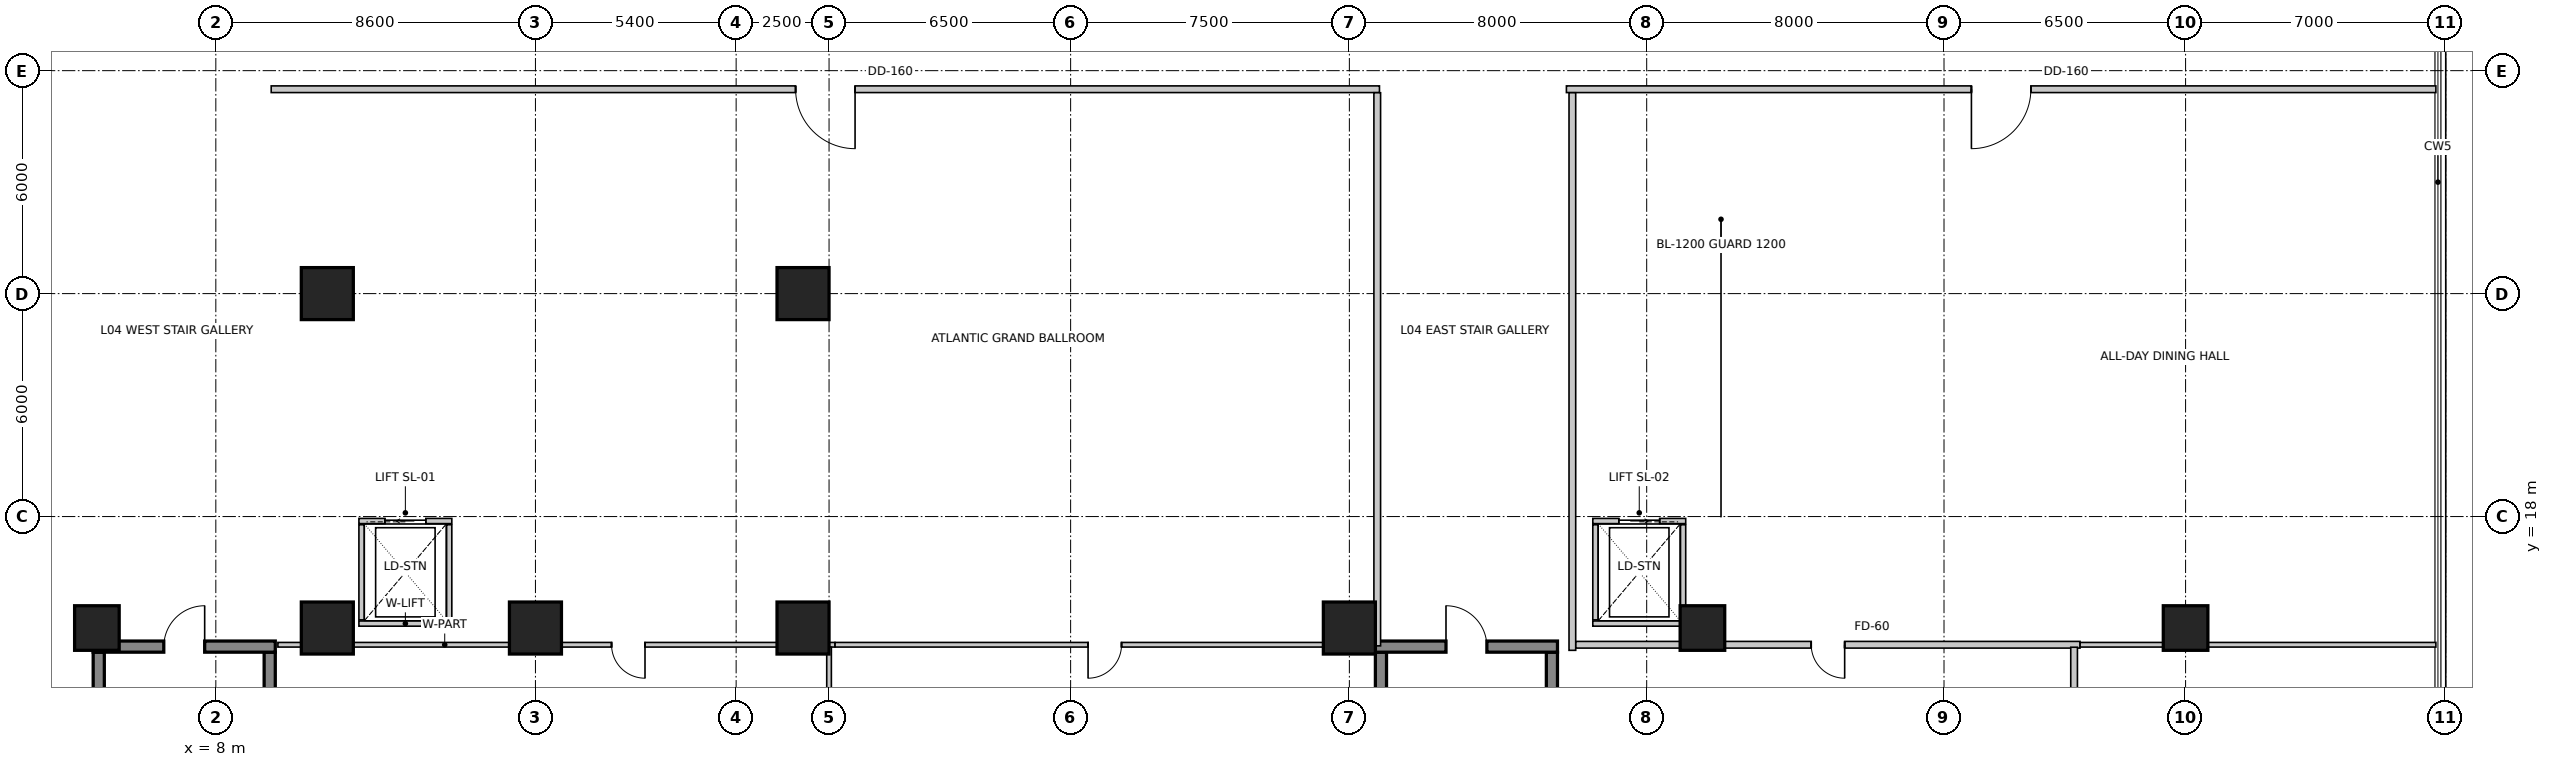
"""IFC4 building model, lengths in metres.
Left out: names, types, materials, properties, quantities, classifications, styles, units other than length and angle.
Written with IfcOpenShell. Run it as: python <this file> out.ifc"""

import sys

from ifc_helpers import new_model, si_unit, direction, frame, frame_2d, origin, origin_2d, place, context, subcontext, project, spatial, rectangle, extrude, source, transform, mapped, element, fill, save


model = new_model("IFC4")
c1 = context("Model", 3, precision=1e-05, world=origin(), true_north=direction((0.0, 1.0)))
c2 = subcontext(c1, "Body", "Model", "MODEL_VIEW")
j1 = project(units=[si_unit("LENGTHUNIT", "METRE"), si_unit("PLANEANGLEUNIT", "RADIAN")], contexts=[c1])
p1 = place(None, origin())
s1 = spatial("IfcSite", under=j1, at=p1, CompositionType="ELEMENT")
p2 = place(p1, origin())
s2 = spatial("IfcBuilding", under=s1, at=p2, CompositionType="ELEMENT")
p3 = place(p2, frame((0.0, 0.0, 16.4)))
s3 = spatial("IfcBuildingStorey", under=s2, at=p3, CompositionType="ELEMENT", Elevation=16.4)
for number, where, z_axis, x_axis in (
    (1, (4.85, 4.45, 0.0), (0.0, 0.0, 1.0), (0.0, 1.0, 0.0)),
    (2, (9.45, 4.45, 0.0), (0.0, 0.0, 1.0), (0.0, 1.0, 0.0)),
):
    element("IfcWall", number, at=place(p3, frame(where, z_axis=z_axis, x_axis=x_axis)), inside=s3, PredefinedType="SHEAR", context=c2, shape_type="SweptSolid", body=[
        extrude(rectangle(XDim=9.9, YDim=0.3, at=frame_2d((4.95, 0.0))), origin(), (0.0, 0.0, 1.0), 5.2),
    ])
p4 = place(p3, frame((4.7, 14.5, 0.0), z_axis=(0.0, 0.0, 1.0), x_axis=(1.0, 0.0, 0.0)))
e3 = element("IfcWall", 3, at=p4, inside=s3, PredefinedType="SHEAR", context=c2, shape_type="SweptSolid", body=[
    extrude(rectangle(XDim=4.9, YDim=0.3, at=frame_2d((2.45, 0.0))), origin(), (0.0, 0.0, 1.0), 5.2),
])
m1 = source(origin(), c2, "Body", "SweptSolid", [
    extrude(rectangle(XDim=1.1, YDim=2.15, at=frame_2d((0.55, 1.075))), frame((0.0, 0.16, 0.0), z_axis=(0.0, -1.0, 0.0), x_axis=(1.0, 0.0, 0.0)), (0.0, 0.0, 1.0), 0.32),
])
p5 = place(p4, frame((1.9, 0.0, 0.0)))
e4 = element("IfcOpeningElement", 4, at=p5, cuts=e3, PredefinedType="OPENING", context=c2, shape_type="MappedRepresentation", body=[
    mapped(m1, transform((0.0, 0.0, 0.0), scale=1.0)),
])
for number, where, z_axis, x_axis in (
    (5, (39.35, 4.45, 0.0), (0.0, 0.0, 1.0), (0.0, 1.0, 0.0)),
    (6, (43.95, 4.45, 0.0), (0.0, 0.0, 1.0), (0.0, 1.0, 0.0)),
):
    element("IfcWall", number, at=place(p3, frame(where, z_axis=z_axis, x_axis=x_axis)), inside=s3, PredefinedType="SHEAR", context=c2, shape_type="SweptSolid", body=[
        extrude(rectangle(XDim=9.9, YDim=0.3, at=frame_2d((4.95, 0.0))), origin(), (0.0, 0.0, 1.0), 5.2),
    ])
p6 = place(p3, frame((39.2, 14.5, 0.0), z_axis=(0.0, 0.0, 1.0), x_axis=(1.0, 0.0, 0.0)))
e7 = element("IfcWall", 7, at=p6, inside=s3, PredefinedType="SHEAR", context=c2, shape_type="SweptSolid", body=[
    extrude(rectangle(XDim=4.9, YDim=0.3, at=frame_2d((2.45, 0.0))), origin(), (0.0, 0.0, 1.0), 5.2),
])
p7 = place(p6, frame((1.9, 0.0, 0.0)))
e8 = element("IfcOpeningElement", 8, at=p7, cuts=e7, PredefinedType="OPENING", context=c2, shape_type="MappedRepresentation", body=[
    mapped(m1, transform((0.0, 0.0, 0.0), scale=1.0)),
])
m2 = source(origin(), c2, "Body", "SweptSolid", [
    extrude(rectangle(XDim=1.2, YDim=1.2, at=origin_2d()), origin(), (0.0, 0.0, 1.0), 5.2),
])
p8 = place(p3, frame((4.8, 15.0, 0.0), z_axis=(0.0, 0.0, 1.0), x_axis=(1.0, 0.0, 0.0)))
e9 = element("IfcColumn", 9, at=p8, inside=s3, PredefinedType="COLUMN", context=c2, shape_type="MappedRepresentation", body=[
    mapped(m2, transform((0.0, 0.0, 0.0), scale=1.0)),
])
m3 = source(origin(), c2, "Body", "SweptSolid", [
    extrude(rectangle(XDim=1.4, YDim=1.4, at=origin_2d()), origin(), (0.0, 0.0, 1.0), 5.2),
])
for number, where, z_axis, x_axis in (
    (10, (11.0, 15.0, 0.0), (0.0, 0.0, 1.0), (1.0, 0.0, 0.0)),
    (11, (16.6, 15.0, 0.0), (0.0, 0.0, 1.0), (1.0, 0.0, 0.0)),
    (12, (23.8, 15.0, 0.0), (0.0, 0.0, 1.0), (1.0, 0.0, 0.0)),
    (13, (38.5, 15.0, 0.0), (0.0, 0.0, 1.0), (1.0, 0.0, 0.0)),
):
    element("IfcColumn", number, at=place(p3, frame(where, z_axis=z_axis, x_axis=x_axis)), inside=s3, PredefinedType="COLUMN", context=c2, shape_type="MappedRepresentation", body=[
        mapped(m3, transform((0.0, 0.0, 0.0), scale=1.0)),
    ])
for number, where, z_axis, x_axis in (
    (14, (48.0, 15.0, 0.0), (0.0, 0.0, 1.0), (1.0, 0.0, 0.0)),
    (15, (61.0, 15.0, 0.0), (0.0, 0.0, 1.0), (1.0, 0.0, 0.0)),
):
    element("IfcColumn", number, at=place(p3, frame(where, z_axis=z_axis, x_axis=x_axis)), inside=s3, PredefinedType="COLUMN", context=c2, shape_type="MappedRepresentation", body=[
        mapped(m2, transform((0.0, 0.0, 0.0), scale=1.0)),
    ])
for number, where, z_axis, x_axis in (
    (16, (11.0, 24.0, 0.0), (0.0, 0.0, 1.0), (1.0, 0.0, 0.0)),
    (17, (23.8, 24.0, 0.0), (0.0, 0.0, 1.0), (1.0, 0.0, 0.0)),
):
    element("IfcColumn", number, at=place(p3, frame(where, z_axis=z_axis, x_axis=x_axis)), inside=s3, PredefinedType="COLUMN", context=c2, shape_type="MappedRepresentation", body=[
        mapped(m3, transform((0.0, 0.0, 0.0), scale=1.0)),
    ])
p9 = place(p3, frame((11.85, 17.88, 0.0), z_axis=(0.0, 0.0, 1.0), x_axis=(1.0, 0.0, 0.0)))
e18 = element("IfcWall", 18, at=p9, inside=s3, PredefinedType="SOLIDWALL", context=c2, shape_type="SweptSolid", body=[
    extrude(rectangle(XDim=2.5, YDim=0.14, at=frame_2d((1.25, 0.0))), origin(), (0.0, 0.0, 1.0), 4.85),
])
m4 = source(origin(), c2, "Body", "SweptSolid", [
    extrude(rectangle(XDim=1.1, YDim=2.15, at=frame_2d((0.55, 1.075))), frame((0.0, 0.08, 0.0), z_axis=(0.0, -1.0, 0.0), x_axis=(1.0, 0.0, 0.0)), (0.0, 0.0, 1.0), 0.16),
])
p10 = place(p9, frame((0.7, 0.0, 0.0)))
e19 = element("IfcOpeningElement", 19, at=p10, cuts=e18, PredefinedType="OPENING", context=c2, shape_type="MappedRepresentation", body=[
    mapped(m4, transform((0.0, 0.0, 0.0), scale=1.0)),
])
p11 = place(p3, frame((11.85, 15.12, 0.0), z_axis=(0.0, 0.0, 1.0), x_axis=(1.0, 0.0, 0.0)))
e20 = element("IfcWall", 20, at=p11, inside=s3, PredefinedType="SOLIDWALL", context=c2, shape_type="SweptSolid", body=[
    extrude(rectangle(XDim=2.5, YDim=0.14, at=frame_2d((1.25, 0.0))), origin(), (0.0, 0.0, 1.0), 3.642),
])
for number, where, z_axis, x_axis in (
    (21, (11.92, 15.22, 0.0), (0.0, 0.0, 1.0), (0.0, 1.0, 0.0)),
    (22, (14.28, 15.22, 0.0), (0.0, 0.0, 1.0), (0.0, 1.0, 0.0)),
):
    element("IfcWall", number, at=place(p3, frame(where, z_axis=z_axis, x_axis=x_axis)), inside=s3, PredefinedType="SOLIDWALL", context=c2, shape_type="SweptSolid", body=[
        extrude(rectangle(XDim=2.56, YDim=0.14, at=frame_2d((1.28, 0.0))), origin(), (0.0, 0.0, 1.0), 3.642),
    ])
p12 = place(p3, frame((45.05, 17.88, 0.0), z_axis=(0.0, 0.0, 1.0), x_axis=(1.0, 0.0, 0.0)))
e23 = element("IfcWall", 23, at=p12, inside=s3, PredefinedType="SOLIDWALL", context=c2, shape_type="SweptSolid", body=[
    extrude(rectangle(XDim=2.5, YDim=0.14, at=frame_2d((1.25, 0.0))), origin(), (0.0, 0.0, 1.0), 4.85),
])
p13 = place(p12, frame((0.7, 0.0, 0.0)))
e24 = element("IfcOpeningElement", 24, at=p13, cuts=e23, PredefinedType="OPENING", context=c2, shape_type="MappedRepresentation", body=[
    mapped(m4, transform((0.0, 0.0, 0.0), scale=1.0)),
])
p14 = place(p3, frame((45.05, 15.12, 0.0), z_axis=(0.0, 0.0, 1.0), x_axis=(1.0, 0.0, 0.0)))
e25 = element("IfcWall", 25, at=p14, inside=s3, PredefinedType="SOLIDWALL", context=c2, shape_type="SweptSolid", body=[
    extrude(rectangle(XDim=2.5, YDim=0.14, at=frame_2d((1.25, 0.0))), origin(), (0.0, 0.0, 1.0), 3.642),
])
p15 = place(p3, frame((45.12, 15.22, 0.0), z_axis=(0.0, 0.0, 1.0), x_axis=(0.0, 1.0, 0.0)))
e26 = element("IfcWall", 26, at=p15, inside=s3, PredefinedType="SOLIDWALL", context=c2, shape_type="SweptSolid", body=[
    extrude(rectangle(XDim=2.56, YDim=0.14, at=frame_2d((1.28, 0.0))), origin(), (0.0, 0.0, 1.0), 3.642),
])
p16 = place(p3, frame((47.48, 15.22, 0.0), z_axis=(0.0, 0.0, 1.0), x_axis=(0.0, 1.0, 0.0)))
e27 = element("IfcWall", 27, at=p16, inside=s3, PredefinedType="SOLIDWALL", context=c2, shape_type="SweptSolid", body=[
    extrude(rectangle(XDim=2.56, YDim=0.14, at=frame_2d((1.28, 0.0))), origin(), (0.0, 0.0, 1.0), 3.042),
])
p17 = place(p3, frame((39.31, 29.5, 0.0), z_axis=(0.0, 0.0, 1.0), x_axis=(-1.0, 0.0, 0.0)))
e28 = element("IfcWall", 28, at=p17, inside=s3, PredefinedType="PARTITIONING", context=c2, shape_type="SweptSolid", body=[
    extrude(rectangle(XDim=29.82, YDim=0.18, at=frame_2d((14.91, 0.0))), origin(), (0.0, 0.0, 1.0), 3.98),
])
m5 = source(origin(), c2, "Body", "SweptSolid", [
    extrude(rectangle(XDim=1.6, YDim=2.15, at=frame_2d((0.8, 1.075))), frame((0.0, 0.1, 0.0), z_axis=(0.0, -1.0, 0.0), x_axis=(1.0, 0.0, 0.0)), (0.0, 0.0, 1.0), 0.2),
])
p18 = place(p17, frame((14.11, 0.0, 0.0)))
e29 = element("IfcOpeningElement", 29, at=p18, cuts=e28, PredefinedType="OPENING", context=c2, shape_type="MappedRepresentation", body=[
    mapped(m5, transform((0.0, 0.0, 0.0), scale=1.0)),
])
p19 = place(p3, frame((67.735, 29.5, 0.0), z_axis=(0.0, 0.0, 1.0), x_axis=(-1.0, 0.0, 0.0)))
e30 = element("IfcWall", 30, at=p19, inside=s3, PredefinedType="PARTITIONING", context=c2, shape_type="SweptSolid", body=[
    extrude(rectangle(XDim=23.395, YDim=0.18, at=frame_2d((11.698, 0.0))), origin(), (0.0, 0.0, 1.0), 3.042),
])
p20 = place(p19, frame((10.897, 0.0, 0.0)))
e31 = element("IfcOpeningElement", 31, at=p20, cuts=e30, PredefinedType="OPENING", context=c2, shape_type="MappedRepresentation", body=[
    mapped(m5, transform((0.0, 0.0, 0.0), scale=1.0)),
])
p21 = place(p3, frame((39.25, 14.52, 0.0), z_axis=(0.0, 0.0, 1.0), x_axis=(0.0, 1.0, 0.0)))
e32 = element("IfcWall", 32, at=p21, inside=s3, PredefinedType="PARTITIONING", context=c2, shape_type="SweptSolid", body=[
    extrude(rectangle(XDim=14.886, YDim=0.18, at=frame_2d((7.443, 0.0))), origin(), (0.0, 0.0, 1.0), 3.642),
])
p22 = place(p3, frame((44.5, 29.406, 0.0), z_axis=(0.0, 0.0, 1.0), x_axis=(0.0, -1.0, 0.0)))
e33 = element("IfcWall", 33, at=p22, inside=s3, PredefinedType="PARTITIONING", context=c2, shape_type="SweptSolid", body=[
    extrude(rectangle(XDim=15.006, YDim=0.18, at=frame_2d((7.503, 0.0))), origin(), (0.0, 0.0, 1.0), 3.642),
])
p23 = place(p3, frame((24.66, 14.55, 0.0), z_axis=(0.0, 0.0, 1.0), x_axis=(-1.0, 0.0, 0.0)))
e34 = element("IfcWall", 34, at=p23, inside=s3, PredefinedType="PARTITIONING", context=c2, shape_type="SweptSolid", body=[
    extrude(rectangle(XDim=14.99, YDim=0.125, at=frame_2d((7.495, 0.0))), origin(), (0.0, 0.0, 1.0), 3.892),
])
m6 = source(origin(), c2, "Body", "SweptSolid", [
    extrude(rectangle(XDim=0.9, YDim=2.15, at=frame_2d((0.45, 1.075))), frame((0.0, 0.073, 0.0), z_axis=(0.0, -1.0, 0.0), x_axis=(1.0, 0.0, 0.0)), (0.0, 0.0, 1.0), 0.145),
])
p24 = place(p23, frame((5.112, 0.0, 0.0)))
e35 = element("IfcOpeningElement", 35, at=p24, cuts=e34, PredefinedType="OPENING", context=c2, shape_type="MappedRepresentation", body=[
    mapped(m6, transform((0.0, 0.0, 0.0), scale=1.0)),
])
p25 = place(p3, frame((39.056, 14.55, 0.0), z_axis=(0.0, 0.0, 1.0), x_axis=(-1.0, 0.0, 0.0)))
e36 = element("IfcWall", 36, at=p25, inside=s3, PredefinedType="PARTITIONING", context=c2, shape_type="SweptSolid", body=[
    extrude(rectangle(XDim=14.394, YDim=0.125, at=frame_2d((7.197, 0.0))), origin(), (0.0, 0.0, 1.0), 4.435),
])
p26 = place(p25, frame((6.687, 0.0, 0.0)))
e37 = element("IfcOpeningElement", 37, at=p26, cuts=e36, PredefinedType="OPENING", context=c2, shape_type="MappedRepresentation", body=[
    mapped(m6, transform((0.0, 0.0, 0.0), scale=1.0)),
])
p27 = place(p3, frame((58.16, 14.55, 0.0), z_axis=(0.0, 0.0, 1.0), x_axis=(-1.0, 0.0, 0.0)))
e38 = element("IfcWall", 38, at=p27, inside=s3, PredefinedType="PARTITIONING", context=c2, shape_type="SweptSolid", body=[
    extrude(rectangle(XDim=13.566, YDim=0.18, at=frame_2d((6.783, 0.0))), origin(), (0.0, 0.0, 1.0), 3.892),
])
m7 = source(origin(), c2, "Body", "SweptSolid", [
    extrude(rectangle(XDim=0.9, YDim=2.15, at=frame_2d((0.45, 1.075))), frame((0.0, 0.1, 0.0), z_axis=(0.0, -1.0, 0.0), x_axis=(1.0, 0.0, 0.0)), (0.0, 0.0, 1.0), 0.2),
])
p28 = place(p27, frame((6.333, 0.0, 0.0)))
e39 = element("IfcOpeningElement", 39, at=p28, cuts=e38, PredefinedType="OPENING", context=c2, shape_type="MappedRepresentation", body=[
    mapped(m7, transform((0.0, 0.0, 0.0), scale=1.0)),
])
p29 = place(p3, frame((67.735, 14.55, 0.0), z_axis=(0.0, 0.0, 1.0), x_axis=(-1.0, 0.0, 0.0)))
e40 = element("IfcWall", 40, at=p29, inside=s3, PredefinedType="PARTITIONING", context=c2, shape_type="SweptSolid", body=[
    extrude(rectangle(XDim=9.573, YDim=0.125, at=frame_2d((4.787, 0.0))), origin(), (0.0, 0.0, 1.0), 3.892),
])
p30 = place(p3, frame((58.0, 14.483, 0.0), z_axis=(0.0, 0.0, 1.0), x_axis=(0.0, -1.0, 0.0)))
e41 = element("IfcWall", 41, at=p30, inside=s3, PredefinedType="PARTITIONING", context=c2, shape_type="SweptSolid", body=[
    extrude(rectangle(XDim=12.219, YDim=0.18, at=frame_2d((6.109, 0.0))), origin(), (0.0, 0.0, 1.0), 3.642),
])
p31 = place(p30, frame((5.599, 0.0, 0.0)))
e42 = element("IfcOpeningElement", 42, at=p31, cuts=e41, PredefinedType="OPENING", context=c2, shape_type="MappedRepresentation", body=[
    mapped(m7, transform((0.0, 0.0, 0.0), scale=1.0)),
])
p32 = place(p3, frame((24.5, 14.483, 0.0), z_axis=(0.0, 0.0, 1.0), x_axis=(0.0, -1.0, 0.0)))
e43 = element("IfcWall", 43, at=p32, inside=s3, PredefinedType="PARTITIONING", context=c2, shape_type="SweptSolid", body=[
    extrude(rectangle(XDim=12.219, YDim=0.125, at=frame_2d((6.109, 0.0))), origin(), (0.0, 0.0, 1.0), 3.642),
])
m8 = source(origin(), c2, "Body", "SweptSolid", [
    extrude(rectangle(XDim=1.1, YDim=2.15, at=frame_2d((0.55, 1.075))), frame((0.0, 0.025, 0.0), z_axis=(0.0, -1.0, 0.0), x_axis=(1.0, 0.0, 0.0)), (0.0, 0.0, 1.0), 0.05),
])
p33 = place(p10, origin())
e44 = element("IfcDoor", 44, at=p33, inside=s3, OperationType="SLIDING_TO_LEFT", PredefinedType="DOOR", context=c2, shape_type="MappedRepresentation", body=[
    mapped(m8, transform((0.0, 0.0, 0.0), scale=1.0)),
])
fill(e19, e44)
p34 = place(p13, origin())
e45 = element("IfcDoor", 45, at=p34, inside=s3, OperationType="SLIDING_TO_RIGHT", PredefinedType="DOOR", context=c2, shape_type="MappedRepresentation", body=[
    mapped(m8, transform((0.0, 0.0, 0.0), scale=1.0)),
])
fill(e24, e45)
m9 = source(origin(), c2, "Body", "SweptSolid", [
    extrude(rectangle(XDim=1.1, YDim=2.15, at=frame_2d((0.55, 1.075))), frame((0.0, 0.025, 0.0), z_axis=(0.0, -1.0, 0.0), x_axis=(1.0, 0.0, 0.0)), (0.0, 0.0, 1.0), 0.05),
])
p35 = place(p5, origin())
e46 = element("IfcDoor", 46, at=p35, inside=s3, OperationType="SINGLE_SWING_RIGHT", PredefinedType="DOOR", context=c2, shape_type="MappedRepresentation", body=[
    mapped(m9, transform((0.0, 0.0, 0.0), scale=1.0)),
])
fill(e4, e46)
p36 = place(p7, origin())
e47 = element("IfcDoor", 47, at=p36, inside=s3, OperationType="SINGLE_SWING_LEFT", PredefinedType="DOOR", context=c2, shape_type="MappedRepresentation", body=[
    mapped(m9, transform((0.0, 0.0, 0.0), scale=1.0)),
])
fill(e8, e47)
m10 = source(origin(), c2, "Body", "SweptSolid", [
    extrude(rectangle(XDim=1.6, YDim=2.15, at=frame_2d((0.8, 1.075))), frame((0.0, 0.025, 0.0), z_axis=(0.0, -1.0, 0.0), x_axis=(1.0, 0.0, 0.0)), (0.0, 0.0, 1.0), 0.05),
])
p37 = place(p18, origin())
e48 = element("IfcDoor", 48, at=p37, inside=s3, OperationType="SINGLE_SWING_LEFT", PredefinedType="DOOR", context=c2, shape_type="MappedRepresentation", body=[
    mapped(m10, transform((0.0, 0.0, 0.0), scale=1.0)),
])
fill(e29, e48)
p38 = place(p20, origin())
e49 = element("IfcDoor", 49, at=p38, inside=s3, OperationType="SINGLE_SWING_RIGHT", PredefinedType="DOOR", context=c2, shape_type="MappedRepresentation", body=[
    mapped(m10, transform((0.0, 0.0, 0.0), scale=1.0)),
])
fill(e31, e49)
m11 = source(origin(), c2, "Body", "SweptSolid", [
    extrude(rectangle(XDim=0.9, YDim=2.15, at=frame_2d((0.45, 1.075))), frame((0.0, 0.025, 0.0), z_axis=(0.0, -1.0, 0.0), x_axis=(1.0, 0.0, 0.0)), (0.0, 0.0, 1.0), 0.05),
])
p39 = place(p28, origin())
e50 = element("IfcDoor", 50, at=p39, inside=s3, OperationType="SINGLE_SWING_LEFT", PredefinedType="DOOR", context=c2, shape_type="MappedRepresentation", body=[
    mapped(m11, transform((0.0, 0.0, 0.0), scale=1.0)),
])
fill(e39, e50)
m12 = source(origin(), c2, "Body", "SweptSolid", [
    extrude(rectangle(XDim=0.9, YDim=2.15, at=frame_2d((0.45, 1.075))), frame((0.0, 0.025, 0.0), z_axis=(0.0, -1.0, 0.0), x_axis=(1.0, 0.0, 0.0)), (0.0, 0.0, 1.0), 0.05),
])
p40 = place(p24, origin())
e51 = element("IfcDoor", 51, at=p40, inside=s3, OperationType="SINGLE_SWING_LEFT", PredefinedType="DOOR", context=c2, shape_type="MappedRepresentation", body=[
    mapped(m12, transform((0.0, 0.0, 0.0), scale=1.0)),
])
fill(e35, e51)
p41 = place(p26, origin())
e52 = element("IfcDoor", 52, at=p41, inside=s3, OperationType="SINGLE_SWING_RIGHT", PredefinedType="DOOR", context=c2, shape_type="MappedRepresentation", body=[
    mapped(m12, transform((0.0, 0.0, 0.0), scale=1.0)),
])
fill(e37, e52)
save(model, sys.argv[1])
